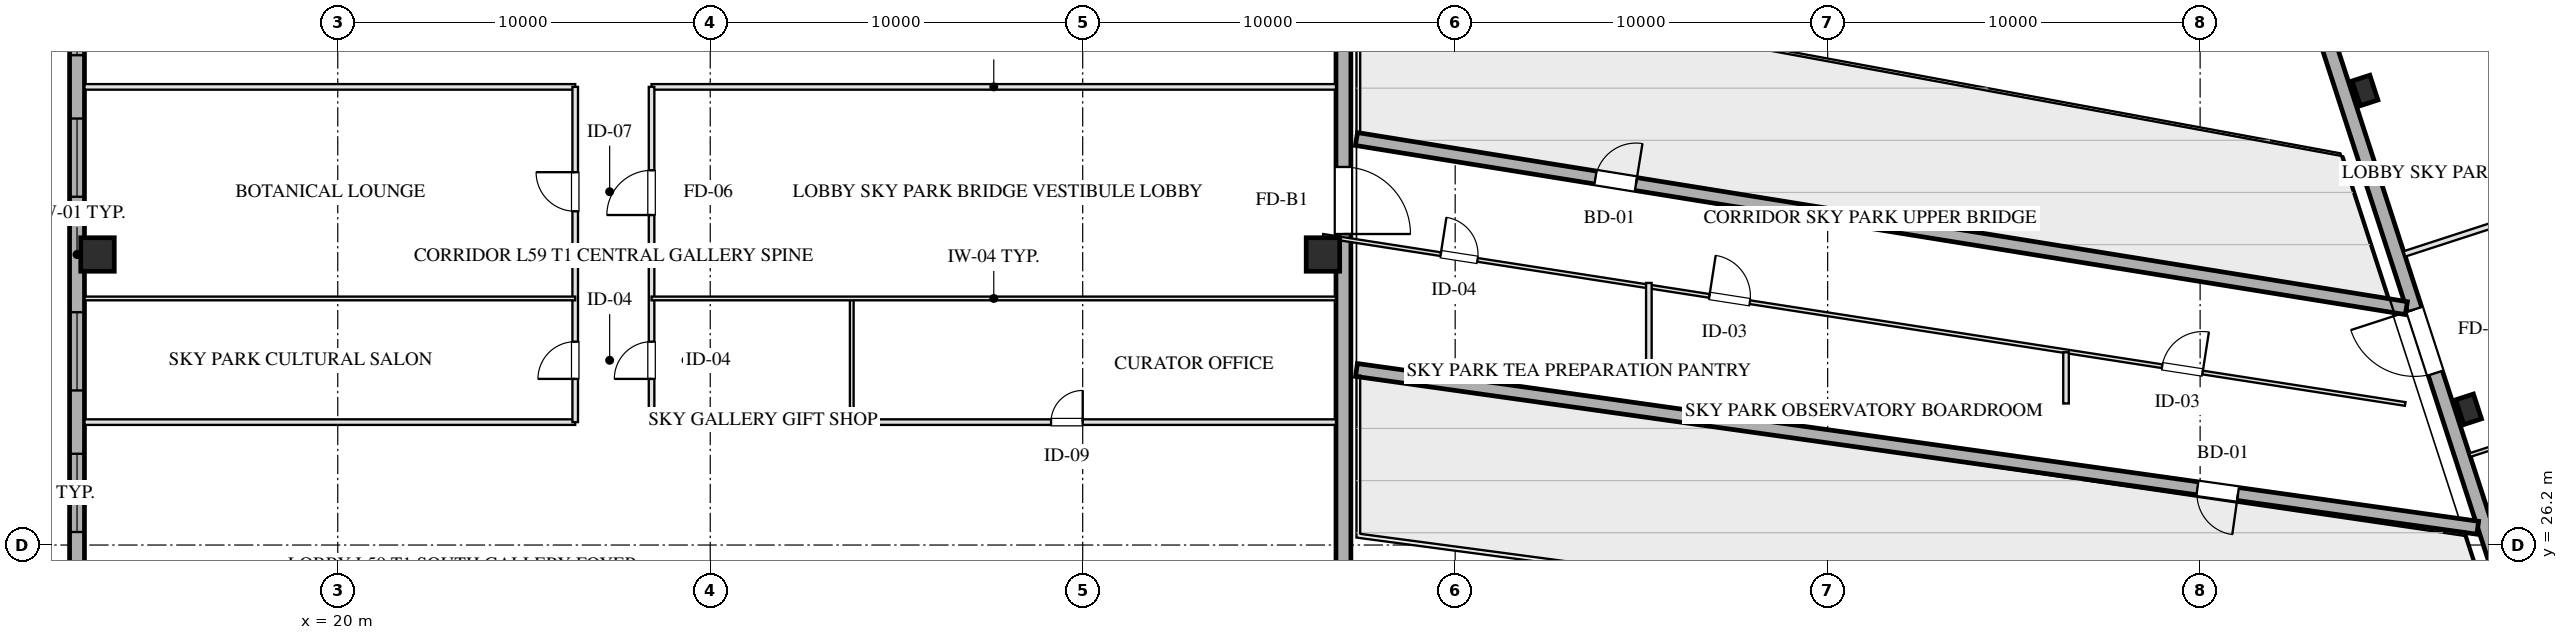
"""IFC4 building model, lengths in metres.
Left out: names, types, materials, properties, quantities, classifications, styles, units other than length and angle.
Written with IfcOpenShell. Run it as: python <this file> out.ifc"""

import sys

from ifc_helpers import new_model, si_unit, direction, frame, frame_2d, origin, origin_2d, place, context, subcontext, project, spatial, rectangle, hollow_rectangle, extrude, element, fill, save


model = new_model("IFC4")
c1 = context("Model", 3, precision=1e-05, world=origin(), true_north=direction((0.0, 1.0)))
c2 = subcontext(c1, "Body", "Model", "MODEL_VIEW")
j1 = project(units=[si_unit("LENGTHUNIT", "METRE"), si_unit("PLANEANGLEUNIT", "RADIAN")], contexts=[c1])
p1 = place(None, origin())
s1 = spatial("IfcSite", under=j1, at=p1, CompositionType="ELEMENT")
p2 = place(p1, origin())
s2 = spatial("IfcBuilding", under=s1, at=p2, CompositionType="ELEMENT")
p3 = place(p2, frame((0.0, 0.0, 219.65)))
s3 = spatial("IfcBuildingStorey", under=s2, at=p3, CompositionType="ELEMENT", Elevation=219.65)
for number, where, z_axis, x_axis in (
    (1, (13.55, 34.0, 0.0), (0.0, 0.0, 1.0), (1.0, 0.0, 0.0)),
    (2, (46.45, 34.0, 0.0), (0.0, 0.0, 1.0), (1.0, 0.0, 0.0)),
):
    element("IfcColumn", number, at=place(p3, frame(where, z_axis=z_axis, x_axis=x_axis)), inside=s3, PredefinedType="COLUMN", context=c2, shape_type="SweptSolid", body=[
        extrude(hollow_rectangle(XDim=0.9, YDim=0.9, WallThickness=0.032, at=origin_2d()), origin(), (0.0, 0.0, 1.0), 3.451),
    ])
for number, where, z_axis, x_axis in (
    (3, (77.208, 29.844, 0.0), (0.0, 0.0, 1.0), (0.951, 0.309, 0.0)),
    (4, (74.427, 38.403, 0.0), (0.0, 0.0, 1.0), (0.951, 0.309, 0.0)),
):
    element("IfcColumn", number, at=place(p3, frame(where, z_axis=z_axis, x_axis=x_axis)), inside=s3, PredefinedType="COLUMN", context=c2, shape_type="SweptSolid", body=[
        extrude(hollow_rectangle(XDim=0.5, YDim=0.7, WallThickness=0.025, at=origin_2d()), origin(), (0.0, 0.0, 1.0), 3.451),
    ])
p4 = place(p3, frame((13.0, 10.8, 0.0), z_axis=(0.0, 0.0, 1.0), x_axis=(0.0, 1.0, 0.0)))
e5 = element("IfcWall", 5, at=p4, inside=s3, PredefinedType="SOLIDWALL", context=c2, shape_type="SweptSolid", body=[
    extrude(rectangle(XDim=46.4, YDim=0.4, at=frame_2d((23.2, 0.0))), origin(), (0.0, 0.0, 1.0), 2.61),
])
p5 = place(p4, frame((15.75, 0.0, 0.75)))
e6 = element("IfcOpeningElement", 6, at=p5, cuts=e5, PredefinedType="OPENING", context=c2, shape_type="SweptSolid", body=[
    extrude(rectangle(XDim=2.1, YDim=1.46, at=frame_2d((1.05, 0.73))), frame((0.0, 0.21, 0.0), z_axis=(0.0, -1.0, 0.0), x_axis=(1.0, 0.0, 0.0)), (0.0, 0.0, 1.0), 0.42),
])
p6 = place(p4, frame((19.55, 0.0, 0.75)))
e7 = element("IfcOpeningElement", 7, at=p6, cuts=e5, PredefinedType="OPENING", context=c2, shape_type="SweptSolid", body=[
    extrude(rectangle(XDim=2.1, YDim=1.46, at=frame_2d((1.05, 0.73))), frame((0.0, 0.21, 0.0), z_axis=(0.0, -1.0, 0.0), x_axis=(1.0, 0.0, 0.0)), (0.0, 0.0, 1.0), 0.42),
])
p7 = place(p4, frame((24.75, 0.0, 0.75)))
e8 = element("IfcOpeningElement", 8, at=p7, cuts=e5, PredefinedType="OPENING", context=c2, shape_type="SweptSolid", body=[
    extrude(rectangle(XDim=2.1, YDim=1.46, at=frame_2d((1.05, 0.73))), frame((0.0, 0.21, 0.0), z_axis=(0.0, -1.0, 0.0), x_axis=(1.0, 0.0, 0.0)), (0.0, 0.0, 1.0), 0.42),
])
p8 = place(p4, frame((28.55, 0.0, 0.75)))
e9 = element("IfcOpeningElement", 9, at=p8, cuts=e5, PredefinedType="OPENING", context=c2, shape_type="SweptSolid", body=[
    extrude(rectangle(XDim=2.1, YDim=1.46, at=frame_2d((1.05, 0.73))), frame((0.0, 0.21, 0.0), z_axis=(0.0, -1.0, 0.0), x_axis=(1.0, 0.0, 0.0)), (0.0, 0.0, 1.0), 0.42),
])
p9 = place(p3, frame((47.0, 57.2, 0.0), z_axis=(0.0, 0.0, 1.0), x_axis=(0.0, -1.0, 0.0)))
e10 = element("IfcWall", 10, at=p9, inside=s3, PredefinedType="SOLIDWALL", context=c2, shape_type="SweptSolid", body=[
    extrude(rectangle(XDim=46.4, YDim=0.4, at=frame_2d((23.2, 0.0))), origin(), (0.0, 0.0, 1.0), 2.61),
])
p10 = place(p9, frame((20.85, 0.0, 0.0)))
e11 = element("IfcOpeningElement", 11, at=p10, cuts=e10, PredefinedType="OPENING", context=c2, shape_type="SweptSolid", body=[
    extrude(rectangle(XDim=1.8, YDim=2.2, at=frame_2d((0.9, 1.1))), frame((0.0, 0.21, 0.0), z_axis=(0.0, -1.0, 0.0), x_axis=(1.0, 0.0, 0.0)), (0.0, 0.0, 1.0), 0.42),
])
p11 = place(p3, frame((82.618, 11.414, 0.0), z_axis=(0.0, 0.0, 1.0), x_axis=(-0.309016491071, 0.951056679828, 0.0)))
e12 = element("IfcWall", 12, at=p11, inside=s3, PredefinedType="SOLIDWALL", context=c2, shape_type="SweptSolid", body=[
    extrude(rectangle(XDim=38.4, YDim=0.4, at=frame_2d((19.2, 0.0))), origin(), (0.0, 0.0, 1.0), 2.61),
])
p12 = place(p11, frame((20.4, 0.0, 0.0)))
e13 = element("IfcOpeningElement", 13, at=p12, cuts=e12, PredefinedType="OPENING", context=c2, shape_type="SweptSolid", body=[
    extrude(rectangle(XDim=1.8, YDim=2.2, at=frame_2d((0.9, 1.1))), frame((0.0, 0.21, 0.0), z_axis=(0.0, -1.0, 0.0), x_axis=(1.0, 0.0, 0.0)), (0.0, 0.0, 1.0), 0.42),
])
p13 = place(p3, frame((77.453, 26.664, 0.0), z_axis=(0.0, 0.0, 1.0), x_axis=(-0.990242401523, 0.13935561067, 0.0)))
e14 = element("IfcWall", 14, at=p13, inside=s3, PredefinedType="SOLIDWALL", context=c2, shape_type="SweptSolid", body=[
    extrude(rectangle(XDim=30.399, YDim=0.35, at=frame_2d((15.2, 0.0))), origin(), (0.0, 0.0, 1.0), 3.4),
])
p14 = place(p13, frame((6.5, 0.0, 0.0)))
e15 = element("IfcOpeningElement", 15, at=p14, cuts=e14, PredefinedType="OPENING", context=c2, shape_type="SweptSolid", body=[
    extrude(rectangle(XDim=1.1, YDim=2.15, at=frame_2d((0.55, 1.075))), frame((0.0, 0.185, 0.0), z_axis=(0.0, -1.0, 0.0), x_axis=(1.0, 0.0, 0.0)), (0.0, 0.0, 1.0), 0.37),
])
p15 = place(p3, frame((47.35, 37.1, 0.0), z_axis=(0.0, 0.0, 1.0), x_axis=(0.98727687058, -0.159010631147, 0.0)))
e16 = element("IfcWall", 16, at=p15, inside=s3, PredefinedType="SOLIDWALL", context=c2, shape_type="SweptSolid", body=[
    extrude(rectangle(XDim=28.55, YDim=0.35, at=frame_2d((14.275, 0.0))), origin(), (0.0, 0.0, 1.0), 3.4),
])
p16 = place(p15, frame((6.5, 0.0, 0.0)))
e17 = element("IfcOpeningElement", 17, at=p16, cuts=e16, PredefinedType="OPENING", context=c2, shape_type="SweptSolid", body=[
    extrude(rectangle(XDim=1.1, YDim=2.15, at=frame_2d((0.55, 1.075))), frame((0.0, 0.185, 0.0), z_axis=(0.0, -1.0, 0.0), x_axis=(1.0, 0.0, 0.0)), (0.0, 0.0, 1.0), 0.37),
])
p17 = place(p3, frame((13.2, 29.5, 0.0), z_axis=(0.0, 0.0, 1.0), x_axis=(1.0, 0.0, 0.0)))
e18 = element("IfcWall", 18, at=p17, inside=s3, PredefinedType="PARTITIONING", context=c2, shape_type="SweptSolid", body=[
    extrude(rectangle(XDim=13.175, YDim=0.15, at=frame_2d((6.587, 0.0))), origin(), (0.0, 0.0, 1.0), 3.175),
])
p18 = place(p3, frame((28.425, 29.5, 0.0), z_axis=(0.0, 0.0, 1.0), x_axis=(1.0, 0.0, 0.0)))
e19 = element("IfcWall", 19, at=p18, inside=s3, PredefinedType="PARTITIONING", context=c2, shape_type="SweptSolid", body=[
    extrude(rectangle(XDim=18.375, YDim=0.15, at=frame_2d((9.188, 0.0))), origin(), (0.0, 0.0, 1.0), 3.175),
])
p19 = place(p18, frame((10.725, 0.0, 0.0)))
e20 = element("IfcOpeningElement", 20, at=p19, cuts=e19, PredefinedType="OPENING", context=c2, shape_type="SweptSolid", body=[
    extrude(rectangle(XDim=0.85, YDim=2.05, at=frame_2d((0.425, 1.025))), frame((0.0, 0.085, 0.0), z_axis=(0.0, -1.0, 0.0), x_axis=(1.0, 0.0, 0.0)), (0.0, 0.0, 1.0), 0.17),
])
p20 = place(p3, frame((13.2, 38.5, 0.0), z_axis=(0.0, 0.0, 1.0), x_axis=(1.0, 0.0, 0.0)))
e21 = element("IfcWall", 21, at=p20, inside=s3, PredefinedType="PARTITIONING", context=c2, shape_type="SweptSolid", body=[
    extrude(rectangle(XDim=13.175, YDim=0.15, at=frame_2d((6.587, 0.0))), origin(), (0.0, 0.0, 1.0), 3.175),
])
p21 = place(p3, frame((28.425, 38.5, 0.0), z_axis=(0.0, 0.0, 1.0), x_axis=(1.0, 0.0, 0.0)))
e22 = element("IfcWall", 22, at=p21, inside=s3, PredefinedType="PARTITIONING", context=c2, shape_type="SweptSolid", body=[
    extrude(rectangle(XDim=18.375, YDim=0.15, at=frame_2d((9.188, 0.0))), origin(), (0.0, 0.0, 1.0), 3.175),
])
p22 = place(p3, frame((26.375, 29.5, 0.0), z_axis=(0.0, 0.0, 1.0), x_axis=(0.0, 1.0, 0.0)))
e23 = element("IfcWall", 23, at=p22, inside=s3, PredefinedType="PARTITIONING", context=c2, shape_type="SweptSolid", body=[
    extrude(rectangle(XDim=9.0, YDim=0.15, at=frame_2d((4.5, 0.0))), origin(), (0.0, 0.0, 1.0), 3.175),
])
p23 = place(p22, frame((1.16, 0.0, 0.0)))
e24 = element("IfcOpeningElement", 24, at=p23, cuts=e23, PredefinedType="OPENING", context=c2, shape_type="SweptSolid", body=[
    extrude(rectangle(XDim=1.0, YDim=2.05, at=frame_2d((0.5, 1.025))), frame((0.0, 0.085, 0.0), z_axis=(0.0, -1.0, 0.0), x_axis=(1.0, 0.0, 0.0)), (0.0, 0.0, 1.0), 0.17),
])
p24 = place(p22, frame((5.66, 0.0, 0.0)))
e25 = element("IfcOpeningElement", 25, at=p24, cuts=e23, PredefinedType="OPENING", context=c2, shape_type="SweptSolid", body=[
    extrude(rectangle(XDim=1.05, YDim=2.05, at=frame_2d((0.525, 1.025))), frame((0.0, 0.085, 0.0), z_axis=(0.0, -1.0, 0.0), x_axis=(1.0, 0.0, 0.0)), (0.0, 0.0, 1.0), 0.17),
])
p25 = place(p3, frame((28.425, 29.5, 0.0), z_axis=(0.0, 0.0, 1.0), x_axis=(0.0, 1.0, 0.0)))
e26 = element("IfcWall", 26, at=p25, inside=s3, PredefinedType="PARTITIONING", context=c2, shape_type="SweptSolid", body=[
    extrude(rectangle(XDim=9.0, YDim=0.15, at=frame_2d((4.5, 0.0))), origin(), (0.0, 0.0, 1.0), 3.175),
])
p26 = place(p25, frame((1.16, 0.0, 0.0)))
e27 = element("IfcOpeningElement", 27, at=p26, cuts=e26, PredefinedType="OPENING", context=c2, shape_type="SweptSolid", body=[
    extrude(rectangle(XDim=1.0, YDim=2.05, at=frame_2d((0.5, 1.025))), frame((0.0, 0.085, 0.0), z_axis=(0.0, -1.0, 0.0), x_axis=(1.0, 0.0, 0.0)), (0.0, 0.0, 1.0), 0.17),
])
p27 = place(p25, frame((5.56, 0.0, 0.0)))
e28 = element("IfcOpeningElement", 28, at=p27, cuts=e26, PredefinedType="OPENING", context=c2, shape_type="SweptSolid", body=[
    extrude(rectangle(XDim=1.2, YDim=2.05, at=frame_2d((0.6, 1.025))), frame((0.0, 0.085, 0.0), z_axis=(0.0, -1.0, 0.0), x_axis=(1.0, 0.0, 0.0)), (0.0, 0.0, 1.0), 0.17),
])
p28 = place(p3, frame((13.2, 32.82, 0.0), z_axis=(0.0, 0.0, 1.0), x_axis=(1.0, 0.0, 0.0)))
e29 = element("IfcWall", 29, at=p28, inside=s3, PredefinedType="MOVABLE", context=c2, shape_type="SweptSolid", body=[
    extrude(rectangle(XDim=13.175, YDim=0.1, at=frame_2d((6.587, 0.0))), origin(), (0.0, 0.0, 1.0), 3.175),
])
p29 = place(p3, frame((33.8, 29.5, 0.0), z_axis=(0.0, 0.0, 1.0), x_axis=(0.0, 1.0, 0.0)))
e30 = element("IfcWall", 30, at=p29, inside=s3, PredefinedType="MOVABLE", context=c2, shape_type="SweptSolid", body=[
    extrude(rectangle(XDim=3.32, YDim=0.1, at=frame_2d((1.66, 0.0))), origin(), (0.0, 0.0, 1.0), 3.175),
])
p30 = place(p3, frame((28.425, 32.82, 0.0), z_axis=(0.0, 0.0, 1.0), x_axis=(1.0, 0.0, 0.0)))
e31 = element("IfcWall", 31, at=p30, inside=s3, PredefinedType="MOVABLE", context=c2, shape_type="SweptSolid", body=[
    extrude(rectangle(XDim=18.375, YDim=0.1, at=frame_2d((9.188, 0.0))), origin(), (0.0, 0.0, 1.0), 3.175),
])
p31 = place(p3, frame((75.485, 34.015, 0.0), z_axis=(0.0, 0.0, 1.0), x_axis=(0.951055402118, 0.30902042344, 0.0)))
e32 = element("IfcWall", 32, at=p31, inside=s3, PredefinedType="PARTITIONING", context=c2, shape_type="SweptSolid", body=[
    extrude(rectangle(XDim=10.175, YDim=0.15, at=frame_2d((5.087, 0.0))), origin(), (0.0, 0.0, 1.0), 3.175),
])
p32 = place(p3, frame((77.24, 28.613, 0.0), z_axis=(0.0, 0.0, 1.0), x_axis=(0.951055402118, 0.30902042344, 0.0)))
e33 = element("IfcWall", 33, at=p32, inside=s3, PredefinedType="MOVABLE", context=c2, shape_type="SweptSolid", body=[
    extrude(rectangle(XDim=10.175, YDim=0.1, at=frame_2d((5.087, 0.0))), origin(), (0.0, 0.0, 1.0), 3.175),
])
p33 = place(p3, frame((46.45, 34.5, 0.0), z_axis=(0.0, 0.0, 1.0), x_axis=(0.988149988354, -0.153491369519, 0.0)))
e34 = element("IfcWall", 34, at=p33, inside=s3, PredefinedType="MOVABLE", context=c2, shape_type="SweptSolid", body=[
    extrude(rectangle(XDim=29.405, YDim=0.1, at=frame_2d((14.703, 0.0))), origin(), (0.0, 0.0, 1.0), 3.175),
])
p34 = place(p33, frame((3.2, 0.0, 0.0)))
e35 = element("IfcOpeningElement", 35, at=p34, cuts=e34, PredefinedType="OPENING", context=c2, shape_type="SweptSolid", body=[
    extrude(rectangle(XDim=1.0, YDim=2.05, at=frame_2d((0.5, 1.025))), frame((0.0, 0.06, 0.0), z_axis=(0.0, -1.0, 0.0), x_axis=(1.0, 0.0, 0.0)), (0.0, 0.0, 1.0), 0.12),
])
p35 = place(p33, frame((10.5, 0.0, 0.0)))
e36 = element("IfcOpeningElement", 36, at=p35, cuts=e34, PredefinedType="OPENING", context=c2, shape_type="SweptSolid", body=[
    extrude(rectangle(XDim=1.1, YDim=2.05, at=frame_2d((0.55, 1.025))), frame((0.0, 0.06, 0.0), z_axis=(0.0, -1.0, 0.0), x_axis=(1.0, 0.0, 0.0)), (0.0, 0.0, 1.0), 0.12),
])
p36 = place(p33, frame((22.8, 0.0, 0.0)))
e37 = element("IfcOpeningElement", 37, at=p36, cuts=e34, PredefinedType="OPENING", context=c2, shape_type="SweptSolid", body=[
    extrude(rectangle(XDim=1.1, YDim=2.05, at=frame_2d((0.55, 1.025))), frame((0.0, 0.06, 0.0), z_axis=(0.0, -1.0, 0.0), x_axis=(1.0, 0.0, 0.0)), (0.0, 0.0, 1.0), 0.12),
])
p37 = place(p3, frame((55.2, 31.15, 0.0), z_axis=(0.0, 0.0, 1.0), x_axis=(0.0, 1.0, 0.0)))
e38 = element("IfcWall", 38, at=p37, inside=s3, PredefinedType="PARTITIONING", context=c2, shape_type="SweptSolid", body=[
    extrude(rectangle(XDim=2.087, YDim=0.15, at=frame_2d((1.043, 0.0))), origin(), (0.0, 0.0, 1.0), 3.175),
])
p38 = place(p3, frame((66.4, 30.0, 0.0), z_axis=(0.0, 0.0, 1.0), x_axis=(0.0, 1.0, 0.0)))
e39 = element("IfcWall", 39, at=p38, inside=s3, PredefinedType="PARTITIONING", context=c2, shape_type="SweptSolid", body=[
    extrude(rectangle(XDim=1.375, YDim=0.15, at=frame_2d((0.688, 0.0))), origin(), (0.0, 0.0, 1.0), 3.175),
])
p39 = place(p5, origin())
e40 = element("IfcWindow", 40, at=p39, inside=s3, PartitioningType="TRIPLE_PANEL_VERTICAL", PredefinedType="WINDOW", context=c2, shape_type="SweptSolid", body=[
    extrude(rectangle(XDim=2.1, YDim=1.46, at=frame_2d((1.05, 0.73))), frame((0.0, 0.03, 0.0), z_axis=(0.0, -1.0, 0.0), x_axis=(1.0, 0.0, 0.0)), (0.0, 0.0, 1.0), 0.06),
])
fill(e6, e40)
p40 = place(p6, origin())
e41 = element("IfcWindow", 41, at=p40, inside=s3, PartitioningType="TRIPLE_PANEL_VERTICAL", PredefinedType="WINDOW", context=c2, shape_type="SweptSolid", body=[
    extrude(rectangle(XDim=2.1, YDim=1.46, at=frame_2d((1.05, 0.73))), frame((0.0, 0.03, 0.0), z_axis=(0.0, -1.0, 0.0), x_axis=(1.0, 0.0, 0.0)), (0.0, 0.0, 1.0), 0.06),
])
fill(e7, e41)
p41 = place(p7, origin())
e42 = element("IfcWindow", 42, at=p41, inside=s3, PartitioningType="TRIPLE_PANEL_VERTICAL", PredefinedType="WINDOW", context=c2, shape_type="SweptSolid", body=[
    extrude(rectangle(XDim=2.1, YDim=1.46, at=frame_2d((1.05, 0.73))), frame((0.0, 0.03, 0.0), z_axis=(0.0, -1.0, 0.0), x_axis=(1.0, 0.0, 0.0)), (0.0, 0.0, 1.0), 0.06),
])
fill(e8, e42)
p42 = place(p8, origin())
e43 = element("IfcWindow", 43, at=p42, inside=s3, PartitioningType="TRIPLE_PANEL_VERTICAL", PredefinedType="WINDOW", context=c2, shape_type="SweptSolid", body=[
    extrude(rectangle(XDim=2.1, YDim=1.46, at=frame_2d((1.05, 0.73))), frame((0.0, 0.03, 0.0), z_axis=(0.0, -1.0, 0.0), x_axis=(1.0, 0.0, 0.0)), (0.0, 0.0, 1.0), 0.06),
])
fill(e9, e43)
p43 = place(p10, origin())
e44 = element("IfcDoor", 44, at=p43, inside=s3, OperationType="SINGLE_SWING_RIGHT", PredefinedType="DOOR", context=c2, shape_type="SweptSolid", body=[
    extrude(rectangle(XDim=1.8, YDim=2.2, at=frame_2d((0.9, 1.1))), frame((0.0, 0.025, 0.0), z_axis=(0.0, -1.0, 0.0), x_axis=(1.0, 0.0, 0.0)), (0.0, 0.0, 1.0), 0.05),
])
fill(e11, e44)
p44 = place(p12, origin())
e45 = element("IfcDoor", 45, at=p44, inside=s3, OperationType="SINGLE_SWING_RIGHT", PredefinedType="DOOR", context=c2, shape_type="SweptSolid", body=[
    extrude(rectangle(XDim=1.8, YDim=2.2, at=frame_2d((0.9, 1.1))), frame((0.0, 0.025, 0.0), z_axis=(0.0, -1.0, 0.0), x_axis=(1.0, 0.0, 0.0)), (0.0, 0.0, 1.0), 0.05),
])
fill(e13, e45)
p45 = place(p14, origin())
e46 = element("IfcDoor", 46, at=p45, inside=s3, OperationType="SINGLE_SWING_LEFT", PredefinedType="DOOR", context=c2, shape_type="SweptSolid", body=[
    extrude(rectangle(XDim=1.1, YDim=2.15, at=frame_2d((0.55, 1.075))), frame((0.0, 0.025, 0.0), z_axis=(0.0, -1.0, 0.0), x_axis=(1.0, 0.0, 0.0)), (0.0, 0.0, 1.0), 0.05),
])
fill(e15, e46)
p46 = place(p16, origin())
e47 = element("IfcDoor", 47, at=p46, inside=s3, OperationType="SINGLE_SWING_RIGHT", PredefinedType="DOOR", context=c2, shape_type="SweptSolid", body=[
    extrude(rectangle(XDim=1.1, YDim=2.15, at=frame_2d((0.55, 1.075))), frame((0.0, 0.025, 0.0), z_axis=(0.0, -1.0, 0.0), x_axis=(1.0, 0.0, 0.0)), (0.0, 0.0, 1.0), 0.05),
])
fill(e17, e47)
p47 = place(p19, origin())
e48 = element("IfcDoor", 48, at=p47, inside=s3, OperationType="SINGLE_SWING_RIGHT", PredefinedType="DOOR", context=c2, shape_type="SweptSolid", body=[
    extrude(rectangle(XDim=0.85, YDim=2.05, at=frame_2d((0.425, 1.025))), frame((0.0, 0.025, 0.0), z_axis=(0.0, -1.0, 0.0), x_axis=(1.0, 0.0, 0.0)), (0.0, 0.0, 1.0), 0.05),
])
fill(e20, e48)
p48 = place(p23, origin())
e49 = element("IfcDoor", 49, at=p48, inside=s3, OperationType="SINGLE_SWING_LEFT", PredefinedType="DOOR", context=c2, shape_type="SweptSolid", body=[
    extrude(rectangle(XDim=1.0, YDim=2.05, at=frame_2d((0.5, 1.025))), frame((0.0, 0.025, 0.0), z_axis=(0.0, -1.0, 0.0), x_axis=(1.0, 0.0, 0.0)), (0.0, 0.0, 1.0), 0.05),
])
fill(e24, e49)
p49 = place(p24, origin())
e50 = element("IfcDoor", 50, at=p49, inside=s3, OperationType="SINGLE_SWING_RIGHT", PredefinedType="DOOR", context=c2, shape_type="SweptSolid", body=[
    extrude(rectangle(XDim=1.05, YDim=2.05, at=frame_2d((0.525, 1.025))), frame((0.0, 0.025, 0.0), z_axis=(0.0, -1.0, 0.0), x_axis=(1.0, 0.0, 0.0)), (0.0, 0.0, 1.0), 0.05),
])
fill(e25, e50)
p50 = place(p26, origin())
e51 = element("IfcDoor", 51, at=p50, inside=s3, OperationType="SINGLE_SWING_LEFT", PredefinedType="DOOR", context=c2, shape_type="SweptSolid", body=[
    extrude(rectangle(XDim=1.0, YDim=2.05, at=frame_2d((0.5, 1.025))), frame((0.0, 0.025, 0.0), z_axis=(0.0, -1.0, 0.0), x_axis=(1.0, 0.0, 0.0)), (0.0, 0.0, 1.0), 0.05),
])
fill(e27, e51)
p51 = place(p27, origin())
e52 = element("IfcDoor", 52, at=p51, inside=s3, OperationType="SINGLE_SWING_LEFT", PredefinedType="DOOR", context=c2, shape_type="SweptSolid", body=[
    extrude(rectangle(XDim=1.2, YDim=2.05, at=frame_2d((0.6, 1.025))), frame((0.0, 0.025, 0.0), z_axis=(0.0, -1.0, 0.0), x_axis=(1.0, 0.0, 0.0)), (0.0, 0.0, 1.0), 0.05),
])
fill(e28, e52)
p52 = place(p34, origin())
e53 = element("IfcDoor", 53, at=p52, inside=s3, OperationType="SINGLE_SWING_LEFT", PredefinedType="DOOR", context=c2, shape_type="SweptSolid", body=[
    extrude(rectangle(XDim=1.0, YDim=2.05, at=frame_2d((0.5, 1.025))), frame((0.0, 0.025, 0.0), z_axis=(0.0, -1.0, 0.0), x_axis=(1.0, 0.0, 0.0)), (0.0, 0.0, 1.0), 0.05),
])
fill(e35, e53)
p53 = place(p35, origin())
e54 = element("IfcDoor", 54, at=p53, inside=s3, OperationType="SINGLE_SWING_LEFT", PredefinedType="DOOR", context=c2, shape_type="SweptSolid", body=[
    extrude(rectangle(XDim=1.1, YDim=2.05, at=frame_2d((0.55, 1.025))), frame((0.0, 0.025, 0.0), z_axis=(0.0, -1.0, 0.0), x_axis=(1.0, 0.0, 0.0)), (0.0, 0.0, 1.0), 0.05),
])
fill(e36, e54)
p54 = place(p36, origin())
e55 = element("IfcDoor", 55, at=p54, inside=s3, OperationType="SINGLE_SWING_RIGHT", PredefinedType="DOOR", context=c2, shape_type="SweptSolid", body=[
    extrude(rectangle(XDim=1.1, YDim=2.05, at=frame_2d((0.55, 1.025))), frame((0.0, 0.025, 0.0), z_axis=(0.0, -1.0, 0.0), x_axis=(1.0, 0.0, 0.0)), (0.0, 0.0, 1.0), 0.05),
])
fill(e37, e55)
save(model, sys.argv[1])
